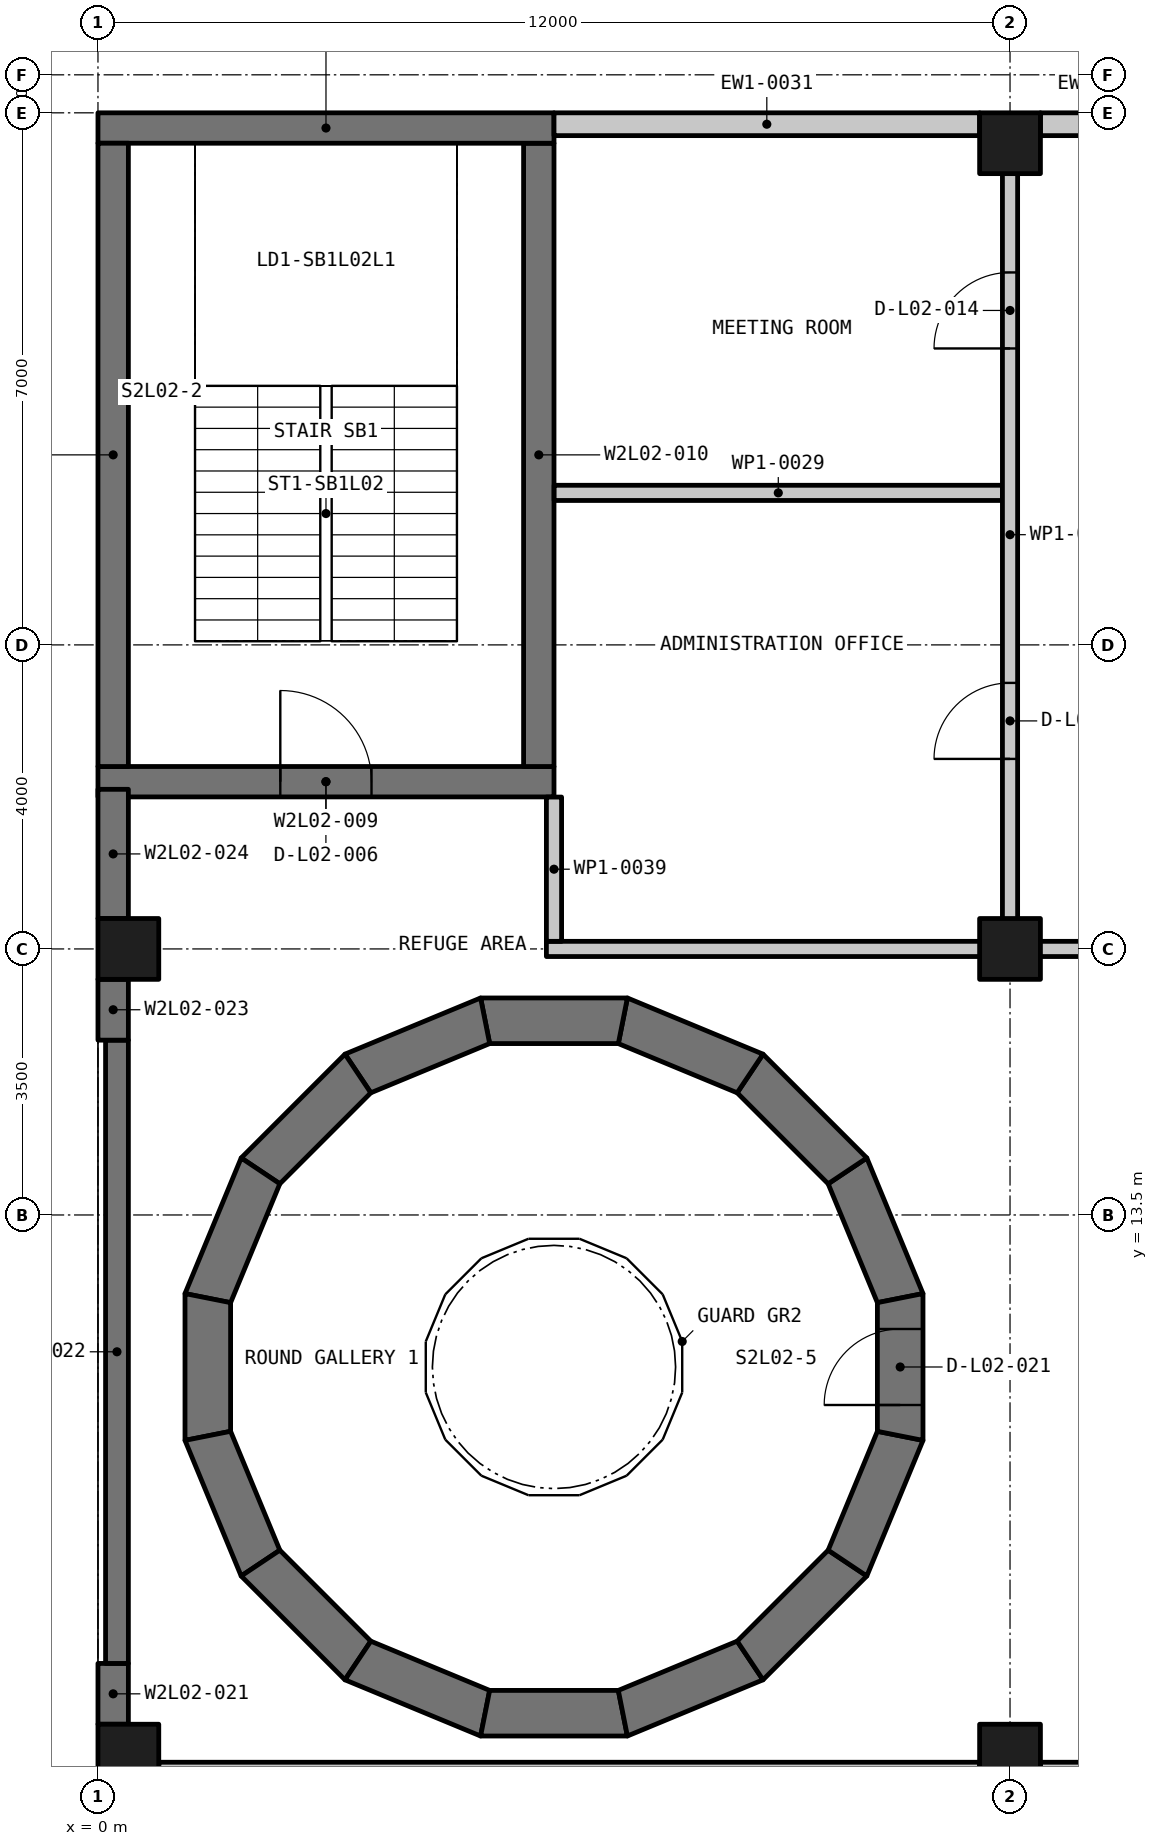
"""IFC4 building model, lengths in metres.
Left out: names, types, materials, properties, quantities, classifications, styles, units other than length and angle.
Written with IfcOpenShell. Run it as: python <this file> out.ifc"""

import sys

from ifc_helpers import new_model, si_unit, direction, frame, frame_2d, origin, origin_2d, place, context, subcontext, project, spatial, polyline, rectangle, outline, extrude, element, fill, save


model = new_model("IFC4")
c1 = context("Model", 3, precision=1e-05, world=origin(), true_north=direction((0.0, 1.0)))
c2 = subcontext(c1, "Body", "Model", "MODEL_VIEW")
j1 = project(units=[si_unit("LENGTHUNIT", "METRE"), si_unit("PLANEANGLEUNIT", "RADIAN")], contexts=[c1])
p1 = place(None, origin())
s1 = spatial("IfcSite", under=j1, at=p1, CompositionType="ELEMENT")
p2 = place(p1, origin())
s2 = spatial("IfcBuilding", under=s1, at=p2, CompositionType="ELEMENT")
p3 = place(p2, frame((0.0, 0.0, 11.25)))
s3 = spatial("IfcBuildingStorey", under=s2, at=p3, CompositionType="ELEMENT", Elevation=11.25)
p4 = place(p3, frame((0.4, 6.4, -0.3), z_axis=(0.0, 0.0, 1.0), x_axis=(1.0, 0.0, 0.0)))
e1 = element("IfcColumn", 1, at=p4, inside=s3, PredefinedType="COLUMN", context=c2, shape_type="SweptSolid", body=[
    extrude(rectangle(XDim=0.8, YDim=0.8, at=origin_2d()), origin(), (0.0, 0.0, 1.0), 4.16),
])
p5 = place(p3, frame((0.4, 17.0, -0.3), z_axis=(0.0, 0.0, 1.0), x_axis=(1.0, 0.0, 0.0)))
e2 = element("IfcColumn", 2, at=p5, inside=s3, PredefinedType="COLUMN", context=c2, shape_type="SweptSolid", body=[
    extrude(rectangle(XDim=0.8, YDim=0.8, at=origin_2d()), origin(), (0.0, 0.0, 1.0), 4.05),
])
p6 = place(p3, frame((12.0, 6.4, -0.3), z_axis=(0.0, 0.0, 1.0), x_axis=(1.0, 0.0, 0.0)))
e3 = element("IfcColumn", 3, at=p6, inside=s3, PredefinedType="COLUMN", context=c2, shape_type="SweptSolid", body=[
    extrude(rectangle(XDim=0.8, YDim=0.8, at=origin_2d()), origin(), (0.0, 0.0, 1.0), 4.16),
])
p7 = place(p3, frame((12.0, 17.0, -0.3), z_axis=(0.0, 0.0, 1.0), x_axis=(1.0, 0.0, 0.0)))
e4 = element("IfcColumn", 4, at=p7, inside=s3, PredefinedType="COLUMN", context=c2, shape_type="SweptSolid", body=[
    extrude(rectangle(XDim=0.8, YDim=0.8, at=origin_2d()), origin(), (0.0, 0.0, 1.0), 4.05),
])
p8 = place(p3, frame((12.0, 27.6, -0.3), z_axis=(0.0, 0.0, 1.0), x_axis=(1.0, 0.0, 0.0)))
e5 = element("IfcColumn", 5, at=p8, inside=s3, PredefinedType="COLUMN", context=c2, shape_type="SweptSolid", body=[
    extrude(rectangle(XDim=0.8, YDim=0.8, at=origin_2d()), origin(), (0.0, 0.0, 1.0), 4.16),
])
p9 = place(p3, frame((10.578, 12.351, -0.3), z_axis=(0.0, 0.0, 1.0), x_axis=(-0.382630895081, 0.923901292417, 0.0)))
e6 = element("IfcWall", 6, at=p9, inside=s3, PredefinedType="SHEAR", context=c2, shape_type="SweptSolid", body=[
    extrude(outline(polyline([(0.0, -0.3), (1.931, -0.3), (1.812, 0.3), (0.119, 0.3), (0.0, -0.3)])), origin(), (0.0, 0.0, 1.0), 4.5),
])
p10 = place(p3, frame((9.904, 14.038, -0.3), z_axis=(0.0, 0.0, 1.0), x_axis=(-0.707106781187, 0.707106781187, 0.0)))
e7 = element("IfcWall", 7, at=p10, inside=s3, PredefinedType="SHEAR", context=c2, shape_type="SweptSolid", body=[
    extrude(outline(polyline([(0.0, -0.3), (1.931, -0.3), (1.812, 0.3), (0.119, 0.3), (0.0, -0.3)])), origin(), (0.0, 0.0, 1.0), 4.5),
])
p11 = place(p3, frame((8.635, 15.339, -0.3), z_axis=(0.0, 0.0, 1.0), x_axis=(-0.923901292417, 0.382630895081, 0.0)))
e8 = element("IfcWall", 8, at=p11, inside=s3, PredefinedType="SHEAR", context=c2, shape_type="SweptSolid", body=[
    extrude(outline(polyline([(0.0, -0.3), (1.931, -0.3), (1.812, 0.3), (0.119, 0.3), (0.0, -0.3)])), origin(), (0.0, 0.0, 1.0), 4.5),
])
p12 = place(p3, frame((6.966, 16.055, -0.3), z_axis=(0.0, 0.0, 1.0), x_axis=(-1.0, 0.0, 0.0)))
e9 = element("IfcWall", 9, at=p12, inside=s3, PredefinedType="SHEAR", context=c2, shape_type="SweptSolid", body=[
    extrude(outline(polyline([(-0.0, -0.3), (1.931, -0.3), (1.812, 0.3), (0.119, 0.3), (-0.0, -0.3)])), origin(), (0.0, 0.0, 1.0), 4.5),
])
p13 = place(p3, frame((5.149, 16.078, -0.3), z_axis=(0.0, 0.0, 1.0), x_axis=(-0.923901292417, -0.382630895081, 0.0)))
e10 = element("IfcWall", 10, at=p13, inside=s3, PredefinedType="SHEAR", context=c2, shape_type="SweptSolid", body=[
    extrude(outline(polyline([(0.0, -0.3), (1.931, -0.3), (1.812, 0.3), (0.119, 0.3), (0.0, -0.3)])), origin(), (0.0, 0.0, 1.0), 4.5),
])
p14 = place(p3, frame((3.462, 15.404, -0.3), z_axis=(0.0, 0.0, 1.0), x_axis=(-0.707106781187, -0.707106781187, 0.0)))
e11 = element("IfcWall", 11, at=p14, inside=s3, PredefinedType="SHEAR", context=c2, shape_type="SweptSolid", body=[
    extrude(outline(polyline([(0.0, -0.3), (1.931, -0.3), (1.812, 0.3), (0.119, 0.3), (0.0, -0.3)])), origin(), (0.0, 0.0, 1.0), 4.5),
])
p15 = place(p3, frame((2.161, 14.135, -0.3), z_axis=(0.0, 0.0, 1.0), x_axis=(-0.382630895081, -0.923901292417, 0.0)))
e12 = element("IfcWall", 12, at=p15, inside=s3, PredefinedType="SHEAR", context=c2, shape_type="SweptSolid", body=[
    extrude(outline(polyline([(0.0, -0.3), (1.931, -0.3), (1.812, 0.3), (0.119, 0.3), (0.0, -0.3)])), origin(), (0.0, 0.0, 1.0), 4.5),
])
p16 = place(p3, frame((1.445, 12.466, -0.3), z_axis=(0.0, 0.0, 1.0), x_axis=(0.0, -1.0, 0.0)))
e13 = element("IfcWall", 13, at=p16, inside=s3, PredefinedType="SHEAR", context=c2, shape_type="SweptSolid", body=[
    extrude(outline(polyline([(-0.0, -0.3), (1.931, -0.3), (1.812, 0.3), (0.119, 0.3), (-0.0, -0.3)])), origin(), (0.0, 0.0, 1.0), 4.5),
])
p17 = place(p3, frame((1.422, 10.649, -0.3), z_axis=(0.0, 0.0, 1.0), x_axis=(0.382630895081, -0.923901292417, 0.0)))
e14 = element("IfcWall", 14, at=p17, inside=s3, PredefinedType="SHEAR", context=c2, shape_type="SweptSolid", body=[
    extrude(outline(polyline([(0.0, -0.3), (1.931, -0.3), (1.812, 0.3), (0.119, 0.3), (0.0, -0.3)])), origin(), (0.0, 0.0, 1.0), 4.5),
])
p18 = place(p3, frame((2.096, 8.962, -0.3), z_axis=(0.0, 0.0, 1.0), x_axis=(0.707106781187, -0.707106781187, 0.0)))
e15 = element("IfcWall", 15, at=p18, inside=s3, PredefinedType="SHEAR", context=c2, shape_type="SweptSolid", body=[
    extrude(outline(polyline([(0.0, -0.3), (1.931, -0.3), (1.812, 0.3), (0.119, 0.3), (0.0, -0.3)])), origin(), (0.0, 0.0, 1.0), 4.5),
])
p19 = place(p3, frame((3.365, 7.661, -0.3), z_axis=(0.0, 0.0, 1.0), x_axis=(0.923901292417, -0.382630895081, 0.0)))
e16 = element("IfcWall", 16, at=p19, inside=s3, PredefinedType="SHEAR", context=c2, shape_type="SweptSolid", body=[
    extrude(outline(polyline([(0.0, -0.3), (1.931, -0.3), (1.812, 0.3), (0.119, 0.3), (0.0, -0.3)])), origin(), (0.0, 0.0, 1.0), 4.5),
])
p20 = place(p3, frame((5.034, 6.945, -0.3), z_axis=(0.0, 0.0, 1.0), x_axis=(1.0, 0.0, 0.0)))
e17 = element("IfcWall", 17, at=p20, inside=s3, PredefinedType="SHEAR", context=c2, shape_type="SweptSolid", body=[
    extrude(outline(polyline([(-0.0, -0.3), (1.931, -0.3), (1.812, 0.3), (0.119, 0.3), (-0.0, -0.3)])), origin(), (0.0, 0.0, 1.0), 4.5),
])
p21 = place(p3, frame((6.851, 6.922, -0.3), z_axis=(0.0, 0.0, 1.0), x_axis=(0.923901292417, 0.382630895081, 0.0)))
e18 = element("IfcWall", 18, at=p21, inside=s3, PredefinedType="SHEAR", context=c2, shape_type="SweptSolid", body=[
    extrude(outline(polyline([(0.0, -0.3), (1.931, -0.3), (1.812, 0.3), (0.119, 0.3), (0.0, -0.3)])), origin(), (0.0, 0.0, 1.0), 4.5),
])
p22 = place(p3, frame((8.538, 7.596, -0.3), z_axis=(0.0, 0.0, 1.0), x_axis=(0.707106781187, 0.707106781187, 0.0)))
e19 = element("IfcWall", 19, at=p22, inside=s3, PredefinedType="SHEAR", context=c2, shape_type="SweptSolid", body=[
    extrude(outline(polyline([(0.0, -0.3), (1.931, -0.3), (1.812, 0.3), (0.119, 0.3), (0.0, -0.3)])), origin(), (0.0, 0.0, 1.0), 4.5),
])
p23 = place(p3, frame((9.839, 8.865, -0.3), z_axis=(0.0, 0.0, 1.0), x_axis=(0.382630895081, 0.923901292417, 0.0)))
e20 = element("IfcWall", 20, at=p23, inside=s3, PredefinedType="SHEAR", context=c2, shape_type="SweptSolid", body=[
    extrude(outline(polyline([(0.0, -0.3), (1.931, -0.3), (1.812, 0.3), (0.119, 0.3), (0.0, -0.3)])), origin(), (0.0, 0.0, 1.0), 4.5),
])
p24 = place(p3, frame((10.555, 10.534, -0.3), z_axis=(0.0, 0.0, 1.0), x_axis=(0.0, 1.0, 0.0)))
e21 = element("IfcWall", 21, at=p24, inside=s3, PredefinedType="SHEAR", context=c2, shape_type="SweptSolid", body=[
    extrude(outline(polyline([(-0.0, -0.3), (1.931, -0.3), (1.812, 0.3), (0.119, 0.3), (-0.0, -0.3)])), origin(), (0.0, 0.0, 1.0), 4.5),
])
p25 = place(p24, frame((0.466, 0.0, 0.3)))
e22 = element("IfcOpeningElement", 22, at=p25, cuts=e21, PredefinedType="OPENING", context=c2, shape_type="SweptSolid", body=[
    extrude(rectangle(XDim=1.0, YDim=2.2, at=frame_2d((0.5, 1.1))), frame((0.0, 0.31, 0.0), z_axis=(0.0, -1.0, 0.0), x_axis=(1.0, 0.0, 0.0)), (0.0, 0.0, 1.0), 0.62),
])
p26 = place(p3, frame((0.0, 19.2, -0.3), z_axis=(0.0, 0.0, 1.0), x_axis=(1.0, 0.0, 0.0)))
e23 = element("IfcWall", 23, at=p26, inside=s3, PredefinedType="SHEAR", context=c2, shape_type="SweptSolid", body=[
    extrude(rectangle(XDim=6.0, YDim=0.4, at=frame_2d((3.0, 0.0))), origin(), (0.0, 0.0, 1.0), 4.5),
])
p27 = place(p26, frame((2.399, 0.0, 0.3)))
e24 = element("IfcOpeningElement", 24, at=p27, cuts=e23, PredefinedType="OPENING", context=c2, shape_type="SweptSolid", body=[
    extrude(rectangle(XDim=1.2, YDim=2.2, at=frame_2d((0.6, 1.1))), frame((0.0, 0.21, 0.0), z_axis=(0.0, -1.0, 0.0), x_axis=(1.0, 0.0, 0.0)), (0.0, 0.0, 1.0), 0.42),
])
p28 = place(p3, frame((5.8, 19.4, -0.3), z_axis=(0.0, 0.0, 1.0), x_axis=(0.0, 1.0, 0.0)))
e25 = element("IfcWall", 25, at=p28, inside=s3, PredefinedType="SHEAR", context=c2, shape_type="SweptSolid", body=[
    extrude(rectangle(XDim=8.2, YDim=0.4, at=frame_2d((4.1, 0.0))), origin(), (0.0, 0.0, 1.0), 4.5),
])
p29 = place(p3, frame((0.0, 27.8, -0.3), z_axis=(0.0, 0.0, 1.0), x_axis=(1.0, 0.0, 0.0)))
e26 = element("IfcWall", 26, at=p29, inside=s3, PredefinedType="SHEAR", context=c2, shape_type="SweptSolid", body=[
    extrude(rectangle(XDim=6.0, YDim=0.4, at=frame_2d((3.0, 0.0))), origin(), (0.0, 0.0, 1.0), 4.5),
])
p30 = place(p3, frame((0.2, 19.4, -0.3), z_axis=(0.0, 0.0, 1.0), x_axis=(0.0, 1.0, 0.0)))
e27 = element("IfcWall", 27, at=p30, inside=s3, PredefinedType="SHEAR", context=c2, shape_type="SweptSolid", body=[
    extrude(rectangle(XDim=8.2, YDim=0.4, at=frame_2d((4.1, 0.0))), origin(), (0.0, 0.0, 1.0), 4.5),
])
p31 = place(p3, frame((0.2, 6.8, -0.3), z_axis=(0.0, 0.0, 1.0), x_axis=(0.0, 1.0, 0.0)))
e28 = element("IfcWall", 28, at=p31, inside=s3, PredefinedType="SOLIDWALL", context=c2, shape_type="SweptSolid", body=[
    extrude(rectangle(XDim=0.8, YDim=0.4, at=frame_2d((0.4, 0.0))), origin(), (0.0, 0.0, 1.0), 4.5),
])
p32 = place(p3, frame((0.25, 7.6, -0.3), z_axis=(0.0, 0.0, 1.0), x_axis=(0.0, 1.0, 0.0)))
e29 = element("IfcWall", 29, at=p32, inside=s3, PredefinedType="SOLIDWALL", context=c2, shape_type="SweptSolid", body=[
    extrude(rectangle(XDim=8.2, YDim=0.3, at=frame_2d((4.1, 0.0))), origin(), (0.0, 0.0, 1.0), 4.5),
])
p33 = place(p3, frame((0.2, 15.8, -0.3), z_axis=(0.0, 0.0, 1.0), x_axis=(0.0, 1.0, 0.0)))
e30 = element("IfcWall", 30, at=p33, inside=s3, PredefinedType="SOLIDWALL", context=c2, shape_type="SweptSolid", body=[
    extrude(rectangle(XDim=0.8, YDim=0.4, at=frame_2d((0.4, 0.0))), origin(), (0.0, 0.0, 1.0), 4.5),
])
p34 = place(p3, frame((0.2, 17.4, -0.3), z_axis=(0.0, 0.0, 1.0), x_axis=(0.0, 1.0, 0.0)))
e31 = element("IfcWall", 31, at=p34, inside=s3, PredefinedType="SOLIDWALL", context=c2, shape_type="SweptSolid", body=[
    extrude(rectangle(XDim=1.7, YDim=0.4, at=frame_2d((0.85, 0.0))), origin(), (0.0, 0.0, 1.0), 4.5),
])
p35 = place(p3, frame((23.6, 6.15, 0.0), z_axis=(0.0, 0.0, 1.0), x_axis=(-1.0, 0.0, 0.0)))
e32 = element("IfcWall", 32, at=p35, inside=s3, PredefinedType="SOLIDWALL", context=c2, shape_type="SweptSolid", body=[
    extrude(rectangle(XDim=11.2, YDim=0.3, at=frame_2d((5.6, 0.0))), origin(), (0.0, 0.0, 1.0), 3.86),
])
p36 = place(p35, frame((7.85, 0.0, 0.75)))
e33 = element("IfcOpeningElement", 33, at=p36, cuts=e32, PredefinedType="OPENING", context=c2, shape_type="SweptSolid", body=[
    extrude(rectangle(XDim=1.5, YDim=1.5, at=frame_2d((0.75, 0.75))), frame((0.0, 0.16, 0.0), z_axis=(0.0, -1.0, 0.0), x_axis=(1.0, 0.0, 0.0)), (0.0, 0.0, 1.0), 0.32),
])
p37 = place(p35, frame((1.85, 0.0, 0.75)))
e34 = element("IfcOpeningElement", 34, at=p37, cuts=e32, PredefinedType="OPENING", context=c2, shape_type="SweptSolid", body=[
    extrude(rectangle(XDim=1.5, YDim=1.5, at=frame_2d((0.75, 0.75))), frame((0.0, 0.16, 0.0), z_axis=(0.0, -1.0, 0.0), x_axis=(1.0, 0.0, 0.0)), (0.0, 0.0, 1.0), 0.32),
])
p38 = place(p3, frame((11.6, 6.15, 0.0), z_axis=(0.0, 0.0, 1.0), x_axis=(-1.0, 0.0, 0.0)))
e35 = element("IfcWall", 35, at=p38, inside=s3, PredefinedType="SOLIDWALL", context=c2, shape_type="SweptSolid", body=[
    extrude(rectangle(XDim=10.8, YDim=0.3, at=frame_2d((5.4, 0.0))), origin(), (0.0, 0.0, 1.0), 3.86),
])
p39 = place(p3, frame((6.0, 27.85, 0.0), z_axis=(0.0, 0.0, 1.0), x_axis=(1.0, 0.0, 0.0)))
e36 = element("IfcWall", 36, at=p39, inside=s3, PredefinedType="SOLIDWALL", context=c2, shape_type="SweptSolid", body=[
    extrude(rectangle(XDim=5.6, YDim=0.3, at=frame_2d((2.8, 0.0))), origin(), (0.0, 0.0, 1.0), 3.86),
])
p40 = place(p3, frame((12.4, 27.85, 0.0), z_axis=(0.0, 0.0, 1.0), x_axis=(1.0, 0.0, 0.0)))
e37 = element("IfcWall", 37, at=p40, inside=s3, PredefinedType="SOLIDWALL", context=c2, shape_type="SweptSolid", body=[
    extrude(rectangle(XDim=1.675, YDim=0.3, at=frame_2d((0.837, 0.0))), origin(), (0.0, 0.0, 1.0), 3.86),
])
p41 = place(p3, frame((5.9, 17.0, 0.0), z_axis=(0.0, 0.0, 1.0), x_axis=(1.0, 0.0, 0.0)))
e38 = element("IfcWall", 38, at=p41, inside=s3, PredefinedType="PARTITIONING", context=c2, shape_type="SweptSolid", body=[
    extrude(rectangle(XDim=54.2, YDim=0.2, at=frame_2d((27.1, 0.0))), origin(), (0.0, 0.0, 1.0), 3.75),
])
p42 = place(p41, frame((12.3, 0.0, 0.0)))
e39 = element("IfcOpeningElement", 39, at=p42, cuts=e38, PredefinedType="OPENING", context=c2, shape_type="SweptSolid", body=[
    extrude(rectangle(XDim=2.0, YDim=2.1, at=frame_2d((1.0, 1.05))), frame((0.0, 0.11, 0.0), z_axis=(0.0, -1.0, 0.0), x_axis=(1.0, 0.0, 0.0)), (0.0, 0.0, 1.0), 0.22),
])
p43 = place(p41, frame((20.599, 0.0, 0.0)))
e40 = element("IfcOpeningElement", 40, at=p43, cuts=e38, PredefinedType="OPENING", context=c2, shape_type="SweptSolid", body=[
    extrude(rectangle(XDim=2.0, YDim=2.1, at=frame_2d((1.0, 1.05))), frame((0.0, 0.11, 0.0), z_axis=(0.0, -1.0, 0.0), x_axis=(1.0, 0.0, 0.0)), (0.0, 0.0, 1.0), 0.22),
])
p44 = place(p41, frame((47.35, 0.0, 0.0)))
e41 = element("IfcOpeningElement", 41, at=p44, cuts=e38, PredefinedType="OPENING", context=c2, shape_type="SweptSolid", body=[
    extrude(rectangle(XDim=1.5, YDim=2.1, at=frame_2d((0.75, 1.05))), frame((0.0, 0.11, 0.0), z_axis=(0.0, -1.0, 0.0), x_axis=(1.0, 0.0, 0.0)), (0.0, 0.0, 1.0), 0.22),
])
p45 = place(p3, frame((6.002, 23.0, 0.0), z_axis=(0.0, 0.0, 1.0), x_axis=(1.0, 0.0, 0.0)))
e42 = element("IfcWall", 42, at=p45, inside=s3, PredefinedType="PARTITIONING", context=c2, shape_type="SweptSolid", body=[
    extrude(rectangle(XDim=5.898, YDim=0.2, at=frame_2d((2.949, 0.0))), origin(), (0.0, 0.0, 1.0), 4.35),
])
p46 = place(p3, frame((12.0, 17.1, 0.0), z_axis=(0.0, 0.0, 1.0), x_axis=(0.0, 1.0, 0.0)))
e43 = element("IfcWall", 43, at=p46, inside=s3, PredefinedType="PARTITIONING", context=c2, shape_type="SweptSolid", body=[
    extrude(rectangle(XDim=10.7, YDim=0.2, at=frame_2d((5.35, 0.0))), origin(), (0.0, 0.0, 1.0), 3.86),
])
p47 = place(p46, frame((2.4, 0.0, 0.0)))
e44 = element("IfcOpeningElement", 44, at=p47, cuts=e43, PredefinedType="OPENING", context=c2, shape_type="SweptSolid", body=[
    extrude(rectangle(XDim=1.0, YDim=2.1, at=frame_2d((0.5, 1.05))), frame((0.0, 0.11, 0.0), z_axis=(0.0, -1.0, 0.0), x_axis=(1.0, 0.0, 0.0)), (0.0, 0.0, 1.0), 0.22),
])
p48 = place(p46, frame((7.8, 0.0, 0.0)))
e45 = element("IfcOpeningElement", 45, at=p48, cuts=e43, PredefinedType="OPENING", context=c2, shape_type="SweptSolid", body=[
    extrude(rectangle(XDim=1.0, YDim=2.1, at=frame_2d((0.5, 1.05))), frame((0.0, 0.11, 0.0), z_axis=(0.0, -1.0, 0.0), x_axis=(1.0, 0.0, 0.0)), (0.0, 0.0, 1.0), 0.22),
])
p49 = place(p3, frame((6.0, 17.1, 0.0), z_axis=(0.0, 0.0, 1.0), x_axis=(0.0, 1.0, 0.0)))
e46 = element("IfcWall", 46, at=p49, inside=s3, PredefinedType="PARTITIONING", context=c2, shape_type="SweptSolid", body=[
    extrude(rectangle(XDim=1.898, YDim=0.2, at=frame_2d((0.949, 0.0))), origin(), (0.0, 0.0, 1.0), 4.35),
])
p50 = place(p27, origin())
e47 = element("IfcDoor", 47, at=p50, inside=s3, OperationType="SINGLE_SWING_RIGHT", PredefinedType="DOOR", context=c2, shape_type="SweptSolid", body=[
    extrude(rectangle(XDim=1.2, YDim=2.2, at=frame_2d((0.6, 1.1))), frame((0.0, 0.025, 0.0), z_axis=(0.0, -1.0, 0.0), x_axis=(1.0, 0.0, 0.0)), (0.0, 0.0, 1.0), 0.05),
])
fill(e24, e47)
p51 = place(p47, origin())
e48 = element("IfcDoor", 48, at=p51, inside=s3, OperationType="SINGLE_SWING_RIGHT", PredefinedType="DOOR", context=c2, shape_type="SweptSolid", body=[
    extrude(rectangle(XDim=1.0, YDim=2.1, at=frame_2d((0.5, 1.05))), frame((0.0, 0.025, 0.0), z_axis=(0.0, -1.0, 0.0), x_axis=(1.0, 0.0, 0.0)), (0.0, 0.0, 1.0), 0.05),
])
fill(e44, e48)
p52 = place(p48, origin())
e49 = element("IfcDoor", 49, at=p52, inside=s3, OperationType="SINGLE_SWING_LEFT", PredefinedType="DOOR", context=c2, shape_type="SweptSolid", body=[
    extrude(rectangle(XDim=1.0, YDim=2.1, at=frame_2d((0.5, 1.05))), frame((0.0, 0.025, 0.0), z_axis=(0.0, -1.0, 0.0), x_axis=(1.0, 0.0, 0.0)), (0.0, 0.0, 1.0), 0.05),
])
fill(e45, e49)
p53 = place(p25, origin())
e50 = element("IfcDoor", 50, at=p53, inside=s3, OperationType="SINGLE_SWING_LEFT", PredefinedType="DOOR", context=c2, shape_type="SweptSolid", body=[
    extrude(rectangle(XDim=1.0, YDim=2.2, at=frame_2d((0.5, 1.1))), frame((0.0, 0.025, 0.0), z_axis=(0.0, -1.0, 0.0), x_axis=(1.0, 0.0, 0.0)), (0.0, 0.0, 1.0), 0.05),
])
fill(e22, e50)
save(model, sys.argv[1])
